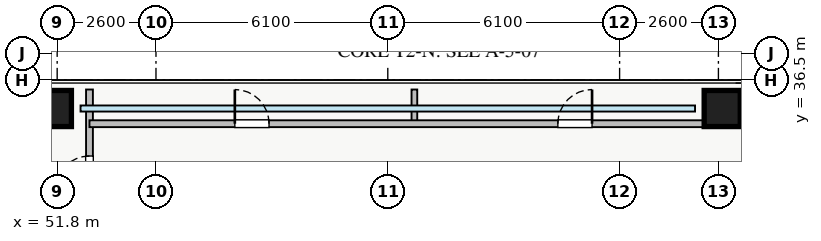
"""IFC4 building model, lengths in metres.
Left out: names, types, materials, properties, quantities, classifications, styles, units other than length and angle.
Written with IfcOpenShell. Run it as: python <this file> out.ifc"""

import sys

from ifc_helpers import new_model, si_unit, direction, frame, frame_2d, origin, origin_2d, place, context, subcontext, project, spatial, rectangle, extrude, source, transform, mapped, element, fill, save


model = new_model("IFC4")
c1 = context("Model", 3, precision=1e-05, world=origin(), true_north=direction((0.0, 1.0)))
c2 = subcontext(c1, "Body", "Model", "MODEL_VIEW")
j1 = project(units=[si_unit("LENGTHUNIT", "METRE"), si_unit("PLANEANGLEUNIT", "RADIAN")], contexts=[c1])
p1 = place(None, origin())
s1 = spatial("IfcSite", under=j1, at=p1, CompositionType="ELEMENT")
p2 = place(p1, origin())
s2 = spatial("IfcBuilding", under=s1, at=p2, CompositionType="ELEMENT")
p3 = place(p2, frame((0.0, 0.0, 60.0)))
s3 = spatial("IfcBuildingStorey", under=s2, at=p3, CompositionType="ELEMENT", Elevation=60.0)
m1 = source(origin(), c2, "Body", "SweptSolid", [
    extrude(rectangle(XDim=0.95, YDim=0.95, at=origin_2d()), origin(), (0.0, 0.0, 1.0), 3.25),
])
for number, where, z_axis, x_axis in (
    (1, (69.3, 35.75, 0.0), (0.0, 0.0, 1.0), (1.0, 0.0, 0.0)),
    (2, (51.7, 35.75, 0.0), (0.0, 0.0, 1.0), (1.0, 0.0, 0.0)),
):
    element("IfcColumn", number, at=place(p3, frame(where, z_axis=z_axis, x_axis=x_axis)), inside=s3, PredefinedType="COLUMN", context=c2, shape_type="MappedRepresentation", body=[
        mapped(m1, transform((0.0, 0.0, 0.0), x_axis=(1.0, 0.0, 0.0), y_axis=(0.0, 1.0, 0.0), z_axis=(0.0, 0.0, 1.0), scale=1.0)),
    ])
p4 = place(p3, frame((52.65, 9.75, 0.0), z_axis=(0.0, 0.0, 1.0), x_axis=(0.0, 1.0, 0.0)))
e3 = element("IfcWall", 3, at=p4, inside=s3, PredefinedType="PARTITIONING", context=c2, shape_type="SweptSolid", body=[
    extrude(rectangle(XDim=26.5, YDim=0.18, at=frame_2d((13.25, 0.0))), origin(), (0.0, 0.0, 1.0), 3.07),
])
p5 = place(p4, frame((23.85, 0.0, 0.0)))
e4 = element("IfcOpeningElement", 4, at=p5, cuts=e3, PredefinedType="OPENING", context=c2, shape_type="SweptSolid", body=[
    extrude(rectangle(XDim=0.9, YDim=2.05, at=frame_2d((0.45, 1.025))), frame((0.0, 0.1, 0.0), z_axis=(0.0, -1.0, 0.0), x_axis=(1.0, 0.0, 0.0)), (0.0, 0.0, 1.0), 0.2),
])
p6 = place(p4, frame((1.75, 0.0, 0.0)))
e5 = element("IfcOpeningElement", 5, at=p6, cuts=e3, PredefinedType="OPENING", context=c2, shape_type="SweptSolid", body=[
    extrude(rectangle(XDim=0.9, YDim=2.05, at=frame_2d((0.45, 1.025))), frame((0.0, 0.1, 0.0), z_axis=(0.0, -1.0, 0.0), x_axis=(1.0, 0.0, 0.0)), (0.0, 0.0, 1.0), 0.2),
])
p7 = place(p4, frame((5.355, 0.0, 0.0)))
e6 = element("IfcOpeningElement", 6, at=p7, cuts=e3, PredefinedType="OPENING", context=c2, shape_type="SweptSolid", body=[
    extrude(rectangle(XDim=1.0, YDim=2.05, at=frame_2d((0.5, 1.025))), frame((0.0, 0.1, 0.0), z_axis=(0.0, -1.0, 0.0), x_axis=(1.0, 0.0, 0.0)), (0.0, 0.0, 1.0), 0.2),
])
p8 = place(p4, frame((15.195, 0.0, 0.0)))
e7 = element("IfcOpeningElement", 7, at=p8, cuts=e3, PredefinedType="OPENING", context=c2, shape_type="SweptSolid", body=[
    extrude(rectangle(XDim=1.0, YDim=2.05, at=frame_2d((0.5, 1.025))), frame((0.0, 0.1, 0.0), z_axis=(0.0, -1.0, 0.0), x_axis=(1.0, 0.0, 0.0)), (0.0, 0.0, 1.0), 0.2),
])
for number, where, z_axis, x_axis in (
    (8, (61.2, 35.35, 0.0), (0.0, 0.0, 1.0), (0.0, 1.0, 0.0)),
    (9, (69.65, 35.35, 0.0), (0.0, 0.0, 1.0), (0.0, 1.0, 0.0)),
):
    element("IfcWall", number, at=place(p3, frame(where, z_axis=z_axis, x_axis=x_axis)), inside=s3, PredefinedType="PARTITIONING", context=c2, shape_type="SweptSolid", body=[
        extrude(rectangle(XDim=0.9, YDim=0.15, at=frame_2d((0.45, 0.0))), origin(), (0.0, 0.0, 1.0), 3.07),
    ])
p9 = place(p3, frame((52.65, 35.35, 0.0), z_axis=(0.0, 0.0, 1.0), x_axis=(1.0, 0.0, 0.0)))
e10 = element("IfcWall", 10, at=p9, inside=s3, PredefinedType="PARTITIONING", context=c2, shape_type="SweptSolid", body=[
    extrude(rectangle(XDim=17.0, YDim=0.18, at=frame_2d((8.5, 0.0))), origin(), (0.0, 0.0, 1.0), 3.07),
])
p10 = place(p9, frame((3.825, 0.0, 0.0)))
e11 = element("IfcOpeningElement", 11, at=p10, cuts=e10, PredefinedType="OPENING", context=c2, shape_type="SweptSolid", body=[
    extrude(rectangle(XDim=0.9, YDim=2.05, at=frame_2d((0.45, 1.025))), frame((0.0, 0.1, 0.0), z_axis=(0.0, -1.0, 0.0), x_axis=(1.0, 0.0, 0.0)), (0.0, 0.0, 1.0), 0.2),
])
p11 = place(p9, frame((12.325, 0.0, 0.0)))
e12 = element("IfcOpeningElement", 12, at=p11, cuts=e10, PredefinedType="OPENING", context=c2, shape_type="SweptSolid", body=[
    extrude(rectangle(XDim=0.9, YDim=2.05, at=frame_2d((0.45, 1.025))), frame((0.0, 0.1, 0.0), z_axis=(0.0, -1.0, 0.0), x_axis=(1.0, 0.0, 0.0)), (0.0, 0.0, 1.0), 0.2),
])
m2 = source(origin(), c2, "Body", "SweptSolid", [
    extrude(rectangle(XDim=0.9, YDim=2.05, at=frame_2d((0.45, 1.025))), frame((0.0, 0.025, 0.0), z_axis=(0.0, -1.0, 0.0), x_axis=(1.0, 0.0, 0.0)), (0.0, 0.0, 1.0), 0.05),
])
p12 = place(p5, origin())
e13 = element("IfcDoor", 13, at=p12, inside=s3, OperationType="SINGLE_SWING_LEFT", PredefinedType="DOOR", context=c2, shape_type="MappedRepresentation", body=[
    mapped(m2, transform((0.0, 0.0, 0.0), x_axis=(1.0, 0.0, 0.0), y_axis=(0.0, 1.0, 0.0), z_axis=(0.0, 0.0, 1.0), scale=1.0)),
])
fill(e4, e13)
p13 = place(p10, origin())
e14 = element("IfcDoor", 14, at=p13, inside=s3, OperationType="SINGLE_SWING_LEFT", PredefinedType="DOOR", context=c2, shape_type="MappedRepresentation", body=[
    mapped(m2, transform((0.0, 0.0, 0.0), x_axis=(1.0, 0.0, 0.0), y_axis=(0.0, 1.0, 0.0), z_axis=(0.0, 0.0, 1.0), scale=1.0)),
])
fill(e11, e14)
p14 = place(p11, origin())
e15 = element("IfcDoor", 15, at=p14, inside=s3, OperationType="SINGLE_SWING_RIGHT", PredefinedType="DOOR", context=c2, shape_type="MappedRepresentation", body=[
    mapped(m2, transform((0.0, 0.0, 0.0), x_axis=(1.0, 0.0, 0.0), y_axis=(0.0, 1.0, 0.0), z_axis=(0.0, 0.0, 1.0), scale=1.0)),
])
fill(e12, e15)
save(model, sys.argv[1])
